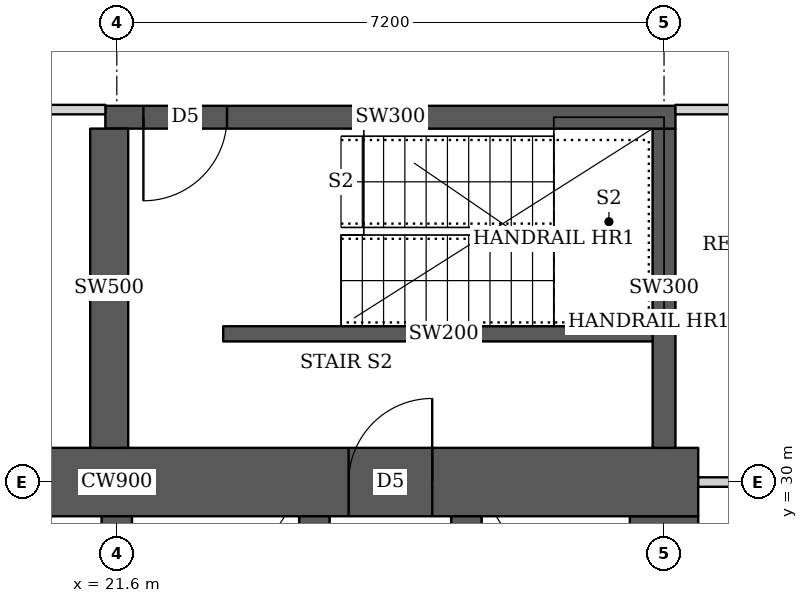
"""IFC4 building model, lengths in metres.
Left out: names, types, materials, properties, quantities, classifications, styles, units other than length and angle.
Written with IfcOpenShell. Run it as: python <this file> out.ifc"""

import sys

from ifc_helpers import new_model, si_unit, direction, frame, frame_2d, origin, place, context, subcontext, project, spatial, rectangle, extrude, element, fill, save


model = new_model("IFC4")
c1 = context("Model", 3, precision=1e-05, world=origin(), true_north=direction((0.0, 1.0)))
c2 = subcontext(c1, "Body", "Model", "MODEL_VIEW")
j1 = project(units=[si_unit("LENGTHUNIT", "METRE"), si_unit("PLANEANGLEUNIT", "RADIAN")], contexts=[c1])
p1 = place(None, origin())
s1 = spatial("IfcSite", under=j1, at=p1, CompositionType="ELEMENT")
p2 = place(p1, origin())
s2 = spatial("IfcBuilding", under=s1, at=p2, CompositionType="ELEMENT")
p3 = place(p2, frame((0.0, 0.0, 281.6)))
s3 = spatial("IfcBuildingStorey", under=s2, at=p3, CompositionType="ELEMENT", Elevation=281.6)
p4 = place(p3, frame((13.95, 30.0, 0.0), z_axis=(0.0, 0.0, 1.0), x_axis=(1.0, 0.0, 0.0)))
e1 = element("IfcWall", 1, at=p4, inside=s3, PredefinedType="SHEAR", context=c2, shape_type="SweptSolid", body=[
    extrude(rectangle(XDim=15.3, YDim=0.9, at=frame_2d((7.65, 0.0))), origin(), (0.0, 0.0, 1.0), 3.75),
])
p5 = place(p4, frame((4.45, 0.0, 0.0)))
e2 = element("IfcOpeningElement", 2, at=p5, cuts=e1, PredefinedType="OPENING", context=c2, shape_type="SweptSolid", body=[
    extrude(rectangle(XDim=1.8, YDim=2.1, at=frame_2d((0.9, 1.05))), frame((0.0, 0.46, 0.0), z_axis=(0.0, -1.0, 0.0), x_axis=(1.0, 0.0, 0.0)), (0.0, 0.0, 1.0), 0.92),
])
p6 = place(p4, frame((10.7, 0.0, 0.0)))
e3 = element("IfcOpeningElement", 3, at=p6, cuts=e1, PredefinedType="OPENING", context=c2, shape_type="SweptSolid", body=[
    extrude(rectangle(XDim=1.1, YDim=2.1, at=frame_2d((0.55, 1.05))), frame((0.0, 0.46, 0.0), z_axis=(0.0, -1.0, 0.0), x_axis=(1.0, 0.0, 0.0)), (0.0, 0.0, 1.0), 0.92),
])
p7 = place(p3, frame((28.8, 15.45, 0.0), z_axis=(0.0, 0.0, 1.0), x_axis=(0.0, 1.0, 0.0)))
e4 = element("IfcWall", 4, at=p7, inside=s3, PredefinedType="SHEAR", context=c2, shape_type="SweptSolid", body=[
    extrude(rectangle(XDim=14.1, YDim=0.9, at=frame_2d((7.05, 0.0))), origin(), (0.0, 0.0, 1.0), 3.75),
])
p8 = place(p3, frame((21.6, 15.45, 0.0), z_axis=(0.0, 0.0, 1.0), x_axis=(0.0, 1.0, 0.0)))
e5 = element("IfcWall", 5, at=p8, inside=s3, PredefinedType="SHEAR", context=c2, shape_type="SweptSolid", body=[
    extrude(rectangle(XDim=14.1, YDim=0.4, at=frame_2d((7.05, 0.0))), origin(), (0.0, 0.0, 1.0), 3.75),
])
p9 = place(p8, frame((0.875, 0.0, 0.0)))
e6 = element("IfcOpeningElement", 6, at=p9, cuts=e5, PredefinedType="OPENING", context=c2, shape_type="SweptSolid", body=[
    extrude(rectangle(XDim=1.1, YDim=2.1, at=frame_2d((0.55, 1.05))), frame((0.0, 0.21, 0.0), z_axis=(0.0, -1.0, 0.0), x_axis=(1.0, 0.0, 0.0)), (0.0, 0.0, 1.0), 0.42),
])
p10 = place(p8, frame((4.625, 0.0, 0.0)))
e7 = element("IfcOpeningElement", 7, at=p10, cuts=e5, PredefinedType="OPENING", context=c2, shape_type="SweptSolid", body=[
    extrude(rectangle(XDim=1.1, YDim=2.1, at=frame_2d((0.55, 1.05))), frame((0.0, 0.21, 0.0), z_axis=(0.0, -1.0, 0.0), x_axis=(1.0, 0.0, 0.0)), (0.0, 0.0, 1.0), 0.42),
])
p11 = place(p8, frame((8.375, 0.0, 0.0)))
e8 = element("IfcOpeningElement", 8, at=p11, cuts=e5, PredefinedType="OPENING", context=c2, shape_type="SweptSolid", body=[
    extrude(rectangle(XDim=1.1, YDim=2.1, at=frame_2d((0.55, 1.05))), frame((0.0, 0.21, 0.0), z_axis=(0.0, -1.0, 0.0), x_axis=(1.0, 0.0, 0.0)), (0.0, 0.0, 1.0), 0.42),
])
p12 = place(p8, frame((12.125, 0.0, 0.0)))
e9 = element("IfcOpeningElement", 9, at=p12, cuts=e5, PredefinedType="OPENING", context=c2, shape_type="SweptSolid", body=[
    extrude(rectangle(XDim=1.1, YDim=2.1, at=frame_2d((0.55, 1.05))), frame((0.0, 0.21, 0.0), z_axis=(0.0, -1.0, 0.0), x_axis=(1.0, 0.0, 0.0)), (0.0, 0.0, 1.0), 0.42),
])
p13 = place(p3, frame((24.2, 15.45, 0.0), z_axis=(0.0, 0.0, 1.0), x_axis=(0.0, 1.0, 0.0)))
e10 = element("IfcWall", 10, at=p13, inside=s3, PredefinedType="SHEAR", context=c2, shape_type="SweptSolid", body=[
    extrude(rectangle(XDim=14.1, YDim=0.4, at=frame_2d((7.05, 0.0))), origin(), (0.0, 0.0, 1.0), 3.75),
])
p14 = place(p3, frame((26.2, 26.45, 0.0), z_axis=(0.0, 0.0, 1.0), x_axis=(0.0, 1.0, 0.0)))
e11 = element("IfcWall", 11, at=p14, inside=s3, PredefinedType="SHEAR", context=c2, shape_type="SweptSolid", body=[
    extrude(rectangle(XDim=3.1, YDim=0.4, at=frame_2d((1.55, 0.0))), origin(), (0.0, 0.0, 1.0), 3.75),
])
p15 = place(p14, frame((1.075, 0.0, 0.0)))
e12 = element("IfcOpeningElement", 12, at=p15, cuts=e11, PredefinedType="OPENING", context=c2, shape_type="SweptSolid", body=[
    extrude(rectangle(XDim=1.2, YDim=2.1, at=frame_2d((0.6, 1.05))), frame((0.0, 0.21, 0.0), z_axis=(0.0, -1.0, 0.0), x_axis=(1.0, 0.0, 0.0)), (0.0, 0.0, 1.0), 0.42),
])
p16 = place(p3, frame((21.45, 34.8, 0.0), z_axis=(0.0, 0.0, 1.0), x_axis=(1.0, 0.0, 0.0)))
e13 = element("IfcWall", 13, at=p16, inside=s3, PredefinedType="SHEAR", context=c2, shape_type="SweptSolid", body=[
    extrude(rectangle(XDim=7.5, YDim=0.3, at=frame_2d((3.75, 0.0))), origin(), (0.0, 0.0, 1.0), 3.75),
])
p17 = place(p16, frame((0.5, 0.0, 0.0)))
e14 = element("IfcOpeningElement", 14, at=p17, cuts=e13, PredefinedType="OPENING", context=c2, shape_type="SweptSolid", body=[
    extrude(rectangle(XDim=1.1, YDim=2.1, at=frame_2d((0.55, 1.05))), frame((0.0, 0.16, 0.0), z_axis=(0.0, -1.0, 0.0), x_axis=(1.0, 0.0, 0.0)), (0.0, 0.0, 1.0), 0.32),
])
p18 = place(p3, frame((21.5, 30.45, 0.0), z_axis=(0.0, 0.0, 1.0), x_axis=(0.0, 1.0, 0.0)))
e15 = element("IfcWall", 15, at=p18, inside=s3, PredefinedType="SHEAR", context=c2, shape_type="SweptSolid", body=[
    extrude(rectangle(XDim=4.2, YDim=0.5, at=frame_2d((2.1, 0.0))), origin(), (0.0, 0.0, 1.0), 3.75),
])
p19 = place(p3, frame((28.8, 30.45, 0.0), z_axis=(0.0, 0.0, 1.0), x_axis=(0.0, 1.0, 0.0)))
e16 = element("IfcWall", 16, at=p19, inside=s3, PredefinedType="SHEAR", context=c2, shape_type="SweptSolid", body=[
    extrude(rectangle(XDim=4.2, YDim=0.3, at=frame_2d((2.1, 0.0))), origin(), (0.0, 0.0, 1.0), 3.75),
])
p20 = place(p3, frame((13.75, 34.9, 0.0), z_axis=(0.0, 0.0, 1.0), x_axis=(1.0, 0.0, 0.0)))
e17 = element("IfcWall", 17, at=p20, inside=s3, PredefinedType="PARTITIONING", context=c2, shape_type="SweptSolid", body=[
    extrude(rectangle(XDim=7.7, YDim=0.125, at=frame_2d((3.85, 0.0))), origin(), (0.0, 0.0, 1.0), 3.5),
])
p21 = place(p20, frame((4.15, 0.0, 0.0)))
e18 = element("IfcOpeningElement", 18, at=p21, cuts=e17, PredefinedType="OPENING", context=c2, shape_type="SweptSolid", body=[
    extrude(rectangle(XDim=1.8, YDim=2.1, at=frame_2d((0.9, 1.05))), frame((0.0, 0.073, 0.0), z_axis=(0.0, -1.0, 0.0), x_axis=(1.0, 0.0, 0.0)), (0.0, 0.0, 1.0), 0.145),
])
p22 = place(p3, frame((28.95, 34.9, 0.0), z_axis=(0.0, 0.0, 1.0), x_axis=(1.0, 0.0, 0.0)))
e19 = element("IfcWall", 19, at=p22, inside=s3, PredefinedType="PARTITIONING", context=c2, shape_type="SweptSolid", body=[
    extrude(rectangle(XDim=4.334, YDim=0.125, at=frame_2d((2.167, 0.0))), origin(), (0.0, 0.0, 1.0), 3.5),
])
p23 = place(p3, frame((29.25, 30.0, 0.0), z_axis=(0.0, 0.0, 1.0), x_axis=(1.0, 0.0, 0.0)))
e20 = element("IfcWall", 20, at=p23, inside=s3, PredefinedType="PARTITIONING", context=c2, shape_type="SweptSolid", body=[
    extrude(rectangle(XDim=3.049, YDim=0.125, at=frame_2d((1.524, 0.0))), origin(), (0.0, 0.0, 1.0), 3.5),
])
p24 = place(p3, frame((23.0, 31.95, 0.0), z_axis=(0.0, 0.0, 1.0), x_axis=(1.0, 0.0, 0.0)))
e21 = element("IfcWall", 21, at=p24, inside=s3, PredefinedType="SHEAR", context=c2, shape_type="SweptSolid", body=[
    extrude(rectangle(XDim=5.8, YDim=0.2, at=frame_2d((2.9, 0.0))), origin(), (0.0, 0.0, 1.0), 3.75),
])
p25 = place(p6, origin())
e22 = element("IfcDoor", 22, at=p25, inside=s3, OperationType="SINGLE_SWING_RIGHT", PredefinedType="DOOR", context=c2, shape_type="SweptSolid", body=[
    extrude(rectangle(XDim=1.1, YDim=2.1, at=frame_2d((0.55, 1.05))), frame((0.0, 0.025, 0.0), z_axis=(0.0, -1.0, 0.0), x_axis=(1.0, 0.0, 0.0)), (0.0, 0.0, 1.0), 0.05),
])
fill(e3, e22)
p26 = place(p17, origin())
e23 = element("IfcDoor", 23, at=p26, inside=s3, OperationType="SINGLE_SWING_RIGHT", PredefinedType="DOOR", context=c2, shape_type="SweptSolid", body=[
    extrude(rectangle(XDim=1.1, YDim=2.1, at=frame_2d((0.55, 1.05))), frame((0.0, 0.025, 0.0), z_axis=(0.0, -1.0, 0.0), x_axis=(1.0, 0.0, 0.0)), (0.0, 0.0, 1.0), 0.05),
])
fill(e14, e23)
save(model, sys.argv[1])
